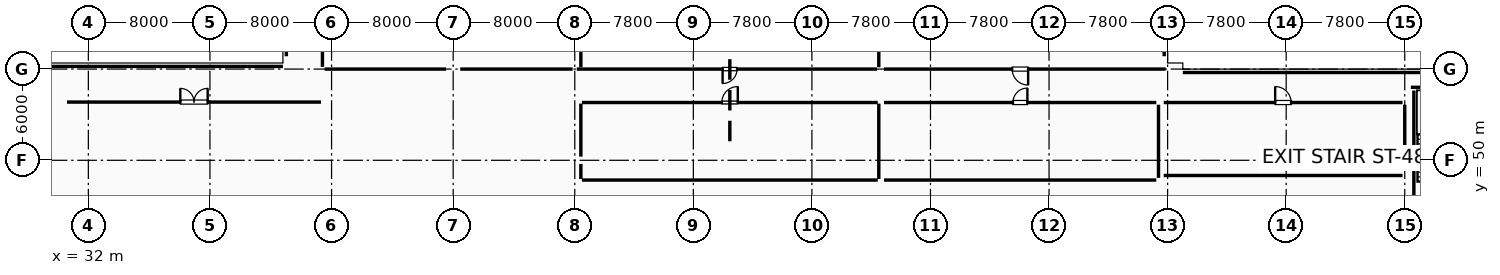
"""IFC4 building model, lengths in metres.
Left out: names, types, materials, properties, quantities, classifications, styles, units other than length and angle.
Written with IfcOpenShell. Run it as: python <this file> out.ifc"""

import sys

from ifc_helpers import new_model, si_unit, direction, frame, frame_2d, origin, origin_2d, place, context, subcontext, project, spatial, rectangle, hollow_rectangle, i_section, extrude, element, fill, save


model = new_model("IFC4")
c1 = context("Model", 3, precision=1e-05, world=origin(), true_north=direction((0.0, 1.0)))
c2 = subcontext(c1, "Body", "Model", "MODEL_VIEW")
j1 = project(units=[si_unit("LENGTHUNIT", "METRE"), si_unit("PLANEANGLEUNIT", "RADIAN")], contexts=[c1])
p1 = place(None, origin())
s1 = spatial("IfcSite", under=j1, at=p1, CompositionType="ELEMENT")
p2 = place(p1, origin())
s2 = spatial("IfcBuilding", under=s1, at=p2, CompositionType="ELEMENT")
p3 = place(p2, frame((0.0, 0.0, -4.8)))
s3 = spatial("IfcBuildingStorey", under=s2, at=p3, CompositionType="ELEMENT", Elevation=-4.8)
for number, where, z_axis, x_axis in (
    (1, (32.0, 50.0, 0.0), (0.0, 0.0, 1.0), (1.0, 0.0, 0.0)),
    (2, (32.0, 56.0, 0.0), (0.0, 0.0, 1.0), (1.0, 0.0, 0.0)),
):
    element("IfcColumn", number, at=place(p3, frame(where, z_axis=z_axis, x_axis=x_axis)), inside=s3, PredefinedType="COLUMN", context=c2, shape_type="SweptSolid", body=[
        extrude(rectangle(XDim=0.75, YDim=0.75, at=origin_2d()), origin(), (0.0, 0.0, 1.0), 4.8),
    ])
for number, where, z_axis, x_axis in (
    (3, (40.0, 50.0, 0.0), (0.0, 0.0, 1.0), (1.0, 0.0, 0.0)),
    (4, (40.0, 56.0, 0.0), (0.0, 0.0, 1.0), (1.0, 0.0, 0.0)),
    (5, (56.0, 50.0, 0.0), (0.0, 0.0, 1.0), (1.0, 0.0, 0.0)),
    (6, (56.0, 56.0, 0.0), (0.0, 0.0, 1.0), (1.0, 0.0, 0.0)),
):
    element("IfcColumn", number, at=place(p3, frame(where, z_axis=z_axis, x_axis=x_axis)), inside=s3, PredefinedType="COLUMN", context=c2, shape_type="SweptSolid", body=[
        extrude(rectangle(XDim=0.9, YDim=0.9, at=origin_2d()), origin(), (0.0, 0.0, 1.0), 4.8),
    ])
p4 = place(p3, frame((64.0, 50.0, 0.0), z_axis=(0.0, 0.0, 1.0), x_axis=(1.0, 0.0, 0.0)))
e7 = element("IfcColumn", 7, at=p4, inside=s3, PredefinedType="COLUMN", context=c2, shape_type="SweptSolid", body=[
    extrude(hollow_rectangle(XDim=0.45, YDim=0.45, WallThickness=0.02, at=origin_2d()), origin(), (0.0, 0.0, 1.0), 4.8),
])
p5 = place(p3, frame((64.0, 56.0, 0.0), z_axis=(0.0, 0.0, 1.0), x_axis=(1.0, 0.0, 0.0)))
e8 = element("IfcColumn", 8, at=p5, inside=s3, PredefinedType="COLUMN", context=c2, shape_type="SweptSolid", body=[
    extrude(i_section(OverallWidth=0.25, OverallDepth=0.45, WebThickness=0.011, FlangeThickness=0.014, FilletRadius=0.015, at=origin_2d()), origin(), (0.0, 0.0, 1.0), 4.8),
])
p6 = place(p3, frame((103.0, 50.0, 0.0), z_axis=(0.0, 0.0, 1.0), x_axis=(1.0, 0.0, 0.0)))
e9 = element("IfcColumn", 9, at=p6, inside=s3, PredefinedType="COLUMN", context=c2, shape_type="SweptSolid", body=[
    extrude(hollow_rectangle(XDim=0.45, YDim=0.45, WallThickness=0.02, at=origin_2d()), origin(), (0.0, 0.0, 1.0), 4.8),
])
p7 = place(p3, frame((103.0, 56.0, 0.0), z_axis=(0.0, 0.0, 1.0), x_axis=(1.0, 0.0, 0.0)))
e10 = element("IfcColumn", 10, at=p7, inside=s3, PredefinedType="COLUMN", context=c2, shape_type="SweptSolid", body=[
    extrude(i_section(OverallWidth=0.25, OverallDepth=0.45, WebThickness=0.011, FlangeThickness=0.014, FilletRadius=0.015, at=origin_2d()), origin(), (0.0, 0.0, 1.0), 4.8),
])
for number, where, z_axis, x_axis in (
    (11, (110.8, 50.0, 0.0), (0.0, 0.0, 1.0), (1.0, 0.0, 0.0)),
    (12, (110.8, 56.0, 0.0), (0.0, 0.0, 1.0), (1.0, 0.0, 0.0)),
):
    element("IfcColumn", number, at=place(p3, frame(where, z_axis=z_axis, x_axis=x_axis)), inside=s3, PredefinedType="COLUMN", context=c2, shape_type="SweptSolid", body=[
        extrude(rectangle(XDim=0.9, YDim=0.9, at=origin_2d()), origin(), (0.0, 0.0, 1.0), 4.8),
    ])
for number, where, z_axis, x_axis in (
    (13, (118.6, 50.0, 0.0), (0.0, 0.0, 1.0), (1.0, 0.0, 0.0)),
    (14, (118.6, 56.0, 0.0), (0.0, 0.0, 1.0), (1.0, 0.0, 0.0)),
):
    element("IfcColumn", number, at=place(p3, frame(where, z_axis=z_axis, x_axis=x_axis)), inside=s3, PredefinedType="COLUMN", context=c2, shape_type="SweptSolid", body=[
        extrude(rectangle(XDim=0.75, YDim=0.75, at=origin_2d()), origin(), (0.0, 0.0, 1.0), 4.8),
    ])
for number, where, z_axis, x_axis in (
    (15, (40.0, 48.2, 0.0), (0.0, 0.0, 1.0), (1.0, 0.0, 0.0)),
    (16, (54.0, 48.2, 0.0), (0.0, 0.0, 1.0), (1.0, 0.0, 0.0)),
    (17, (40.0, 52.3, 0.0), (0.0, 0.0, 1.0), (1.0, 0.0, 0.0)),
    (18, (54.0, 52.3, 0.0), (0.0, 0.0, 1.0), (1.0, 0.0, 0.0)),
):
    element("IfcColumn", number, at=place(p3, frame(where, z_axis=z_axis, x_axis=x_axis)), inside=s3, PredefinedType="COLUMN", context=c2, shape_type="SweptSolid", body=[
        extrude(i_section(OverallWidth=0.25, OverallDepth=0.35, WebThickness=0.01, FlangeThickness=0.012, FilletRadius=0.012, at=origin_2d()), origin(), (0.0, 0.0, 1.0), 4.8),
    ])
p8 = place(p3, frame((16.4, 56.175, 0.0), z_axis=(0.0, 0.0, 1.0), x_axis=(1.0, 0.0, 0.0)))
e19 = element("IfcWall", 19, at=p8, inside=s3, PredefinedType="USERDEFINED", context=c2, shape_type="SweptSolid", body=[
    extrude(rectangle(XDim=28.4, YDim=0.45, at=frame_2d((14.2, 0.0))), origin(), (0.0, 0.0, 1.0), 4.38),
])
for number, where, z_axis, x_axis in (
    (20, (45.025, 56.845, 0.0), (0.0, 0.0, 1.0), (0.0, 1.0, 0.0)),
    (21, (102.775, 82.755, 0.0), (0.0, 0.0, 1.0), (0.0, -1.0, 0.0)),
):
    element("IfcWall", number, at=place(p3, frame(where, z_axis=z_axis, x_axis=x_axis)), inside=s3, PredefinedType="USERDEFINED", context=c2, shape_type="SweptSolid", body=[
        extrude(rectangle(XDim=25.91, YDim=0.45, at=frame_2d((12.955, 0.0))), origin(), (0.0, 0.0, 1.0), 4.38),
    ])
p9 = place(p3, frame((104.0, 55.775, 0.0), z_axis=(0.0, 0.0, 1.0), x_axis=(1.0, 0.0, 0.0)))
e22 = element("IfcWall", 22, at=p9, inside=s3, PredefinedType="USERDEFINED", context=c2, shape_type="SweptSolid", body=[
    extrude(rectangle(XDim=27.2, YDim=0.45, at=frame_2d((13.6, 0.0))), origin(), (0.0, 0.0, 1.0), 4.38),
])
p10 = place(p3, frame((127.4, 54.8, 0.0), z_axis=(0.0, 0.0, 1.0), x_axis=(-1.0, 0.0, 0.0)))
e23 = element("IfcWall", 23, at=p10, inside=s3, PredefinedType="SHEAR", context=c2, shape_type="SweptSolid", body=[
    extrude(rectangle(XDim=8.4, YDim=0.4, at=frame_2d((4.2, 0.0))), origin(), (0.0, 0.0, 1.0), 4.48),
])
p11 = place(p3, frame((119.2, 54.59, 0.0), z_axis=(0.0, 0.0, 1.0), x_axis=(0.0, -1.0, 0.0)))
e24 = element("IfcWall", 24, at=p11, inside=s3, PredefinedType="SHEAR", context=c2, shape_type="SweptSolid", body=[
    extrude(rectangle(XDim=8.38, YDim=0.4, at=frame_2d((4.19, 0.0))), origin(), (0.0, 0.0, 1.0), 4.48),
])
p12 = place(p3, frame((30.595, 53.83, 0.0), z_axis=(0.0, 0.0, 1.0), x_axis=(1.0, 0.0, 0.0)))
e25 = element("IfcWall", 25, at=p12, inside=s3, PredefinedType="PARTITIONING", context=c2, shape_type="SweptSolid", body=[
    extrude(rectangle(XDim=16.71, YDim=0.25, at=frame_2d((8.355, 0.0))), origin(), (0.0, 0.0, 1.0), 4.47),
])
p13 = place(p12, frame((7.455, 0.0, 0.0)))
e26 = element("IfcOpeningElement", 26, at=p13, cuts=e25, PredefinedType="OPENING", context=c2, shape_type="SweptSolid", body=[
    extrude(rectangle(XDim=1.8, YDim=2.15, at=frame_2d((0.9, 1.075))), frame((0.0, 0.135, 0.0), z_axis=(0.0, -1.0, 0.0), x_axis=(1.0, 0.0, 0.0)), (0.0, 0.0, 1.0), 0.27),
])
p14 = place(p3, frame((64.47, 53.8, 0.0), z_axis=(0.0, 0.0, 1.0), x_axis=(1.0, 0.0, 0.0)))
e27 = element("IfcWall", 27, at=p14, inside=s3, PredefinedType="PARTITIONING", context=c2, shape_type="SweptSolid", body=[
    extrude(rectangle(XDim=19.46, YDim=0.1, at=frame_2d((9.73, 0.0))), origin(), (0.0, 0.0, 1.0), 4.39),
])
p15 = place(p14, frame((9.205, 0.0, 0.0)))
e28 = element("IfcOpeningElement", 28, at=p15, cuts=e27, PredefinedType="OPENING", context=c2, shape_type="SweptSolid", body=[
    extrude(rectangle(XDim=1.05, YDim=2.15, at=frame_2d((0.525, 1.075))), frame((0.0, 0.06, 0.0), z_axis=(0.0, -1.0, 0.0), x_axis=(1.0, 0.0, 0.0)), (0.0, 0.0, 1.0), 0.12),
])
p16 = place(p3, frame((84.0, 53.73, 0.0), z_axis=(0.0, 0.0, 1.0), x_axis=(0.0, -1.0, 0.0)))
e29 = element("IfcWall", 29, at=p16, inside=s3, PredefinedType="PARTITIONING", context=c2, shape_type="SweptSolid", body=[
    extrude(rectangle(XDim=4.96, YDim=0.1, at=frame_2d((2.48, 0.0))), origin(), (0.0, 0.0, 1.0), 4.39),
])
p17 = place(p3, frame((83.93, 48.7, 0.0), z_axis=(0.0, 0.0, 1.0), x_axis=(-1.0, 0.0, 0.0)))
e30 = element("IfcWall", 30, at=p17, inside=s3, PredefinedType="PARTITIONING", context=c2, shape_type="SweptSolid", body=[
    extrude(rectangle(XDim=19.46, YDim=0.1, at=frame_2d((9.73, 0.0))), origin(), (0.0, 0.0, 1.0), 4.39),
])
p18 = place(p3, frame((64.4, 48.77, 0.0), z_axis=(0.0, 0.0, 1.0), x_axis=(0.0, 1.0, 0.0)))
e31 = element("IfcWall", 31, at=p18, inside=s3, PredefinedType="PARTITIONING", context=c2, shape_type="SweptSolid", body=[
    extrude(rectangle(XDim=0.99, YDim=0.1, at=frame_2d((0.495, 0.0))), origin(), (0.0, 0.0, 1.0), 4.39),
])
p19 = place(p3, frame((64.4, 50.24, 0.0), z_axis=(0.0, 0.0, 1.0), x_axis=(0.0, 1.0, 0.0)))
e32 = element("IfcWall", 32, at=p19, inside=s3, PredefinedType="PARTITIONING", context=c2, shape_type="SweptSolid", body=[
    extrude(rectangle(XDim=3.49, YDim=0.1, at=frame_2d((1.745, 0.0))), origin(), (0.0, 0.0, 1.0), 4.39),
])
p20 = place(p3, frame((84.0, 70.48, 0.0), z_axis=(0.0, 0.0, 1.0), x_axis=(0.0, -1.0, 0.0)))
e33 = element("IfcWall", 33, at=p20, inside=s3, PredefinedType="PARTITIONING", context=c2, shape_type="SweptSolid", body=[
    extrude(rectangle(XDim=14.36, YDim=0.2, at=frame_2d((7.18, 0.0))), origin(), (0.0, 0.0, 1.0), 4.39),
])
p21 = place(p3, frame((83.88, 56.0, 0.0), z_axis=(0.0, 0.0, 1.0), x_axis=(-1.0, 0.0, 0.0)))
e34 = element("IfcWall", 34, at=p21, inside=s3, PredefinedType="PARTITIONING", context=c2, shape_type="SweptSolid", body=[
    extrude(rectangle(XDim=19.751, YDim=0.2, at=frame_2d((9.875, 0.0))), origin(), (0.0, 0.0, 1.0), 3.78),
])
p22 = place(p21, frame((9.205, 0.0, 0.0)))
e35 = element("IfcOpeningElement", 35, at=p22, cuts=e34, PredefinedType="OPENING", context=c2, shape_type="SweptSolid", body=[
    extrude(rectangle(XDim=0.95, YDim=2.15, at=frame_2d((0.475, 1.075))), frame((0.0, 0.11, 0.0), z_axis=(0.0, -1.0, 0.0), x_axis=(1.0, 0.0, 0.0)), (0.0, 0.0, 1.0), 0.22),
])
p23 = place(p3, frame((64.4, 56.12, 0.0), z_axis=(0.0, 0.0, 1.0), x_axis=(0.0, 1.0, 0.0)))
e36 = element("IfcWall", 36, at=p23, inside=s3, PredefinedType="PARTITIONING", context=c2, shape_type="SweptSolid", body=[
    extrude(rectangle(XDim=14.36, YDim=0.2, at=frame_2d((7.18, 0.0))), origin(), (0.0, 0.0, 1.0), 3.38),
])
p24 = place(p3, frame((102.871, 56.0, 0.0), z_axis=(0.0, 0.0, 1.0), x_axis=(-1.0, 0.0, 0.0)))
e37 = element("IfcWall", 37, at=p24, inside=s3, PredefinedType="PARTITIONING", context=c2, shape_type="SweptSolid", body=[
    extrude(rectangle(XDim=18.526, YDim=0.25, at=frame_2d((9.263, 0.0))), origin(), (0.0, 0.0, 1.0), 3.78),
])
p25 = place(p24, frame((9.046, 0.0, 0.0)))
e38 = element("IfcOpeningElement", 38, at=p25, cuts=e37, PredefinedType="OPENING", context=c2, shape_type="SweptSolid", body=[
    extrude(rectangle(XDim=1.05, YDim=2.15, at=frame_2d((0.525, 1.075))), frame((0.0, 0.135, 0.0), z_axis=(0.0, -1.0, 0.0), x_axis=(1.0, 0.0, 0.0)), (0.0, 0.0, 1.0), 0.27),
])
p26 = place(p3, frame((63.86, 56.0, 0.0), z_axis=(0.0, 0.0, 1.0), x_axis=(-1.0, 0.0, 0.0)))
e39 = element("IfcWall", 39, at=p26, inside=s3, PredefinedType="PARTITIONING", context=c2, shape_type="SweptSolid", body=[
    extrude(rectangle(XDim=7.395, YDim=0.25, at=frame_2d((3.698, 0.0))), origin(), (0.0, 0.0, 1.0), 4.08),
])
p27 = place(p3, frame((55.535, 56.0, 0.0), z_axis=(0.0, 0.0, 1.0), x_axis=(-1.0, 0.0, 0.0)))
e40 = element("IfcWall", 40, at=p27, inside=s3, PredefinedType="PARTITIONING", context=c2, shape_type="SweptSolid", body=[
    extrude(rectangle(XDim=7.99, YDim=0.25, at=frame_2d((3.995, 0.0))), origin(), (0.0, 0.0, 1.0), 4.47),
])
p28 = place(p3, frame((47.4, 56.145, 0.0), z_axis=(0.0, 0.0, 1.0), x_axis=(0.0, 1.0, 0.0)))
e41 = element("IfcWall", 41, at=p28, inside=s3, PredefinedType="PARTITIONING", context=c2, shape_type="SweptSolid", body=[
    extrude(rectangle(XDim=14.31, YDim=0.25, at=frame_2d((7.155, 0.0))), origin(), (0.0, 0.0, 1.0), 4.47),
])
p29 = place(p3, frame((84.345, 53.8, 0.0), z_axis=(0.0, 0.0, 1.0), x_axis=(1.0, 0.0, 0.0)))
e42 = element("IfcWall", 42, at=p29, inside=s3, PredefinedType="PARTITIONING", context=c2, shape_type="SweptSolid", body=[
    extrude(rectangle(XDim=17.91, YDim=0.25, at=frame_2d((8.955, 0.0))), origin(), (0.0, 0.0, 1.0), 4.39),
])
p30 = place(p29, frame((8.48, 0.0, 0.0)))
e43 = element("IfcOpeningElement", 43, at=p30, cuts=e42, PredefinedType="OPENING", context=c2, shape_type="SweptSolid", body=[
    extrude(rectangle(XDim=0.95, YDim=2.15, at=frame_2d((0.475, 1.075))), frame((0.0, 0.135, 0.0), z_axis=(0.0, -1.0, 0.0), x_axis=(1.0, 0.0, 0.0)), (0.0, 0.0, 1.0), 0.27),
])
p31 = place(p3, frame((102.4, 53.655, 0.0), z_axis=(0.0, 0.0, 1.0), x_axis=(0.0, -1.0, 0.0)))
e44 = element("IfcWall", 44, at=p31, inside=s3, PredefinedType="PARTITIONING", context=c2, shape_type="SweptSolid", body=[
    extrude(rectangle(XDim=4.81, YDim=0.25, at=frame_2d((2.405, 0.0))), origin(), (0.0, 0.0, 1.0), 4.47),
])
p32 = place(p3, frame((102.255, 48.7, 0.0), z_axis=(0.0, 0.0, 1.0), x_axis=(-1.0, 0.0, 0.0)))
e45 = element("IfcWall", 45, at=p32, inside=s3, PredefinedType="PARTITIONING", context=c2, shape_type="SweptSolid", body=[
    extrude(rectangle(XDim=17.91, YDim=0.25, at=frame_2d((8.955, 0.0))), origin(), (0.0, 0.0, 1.0), 4.39),
])
p33 = place(p3, frame((102.745, 53.8, 0.0), z_axis=(0.0, 0.0, 1.0), x_axis=(1.0, 0.0, 0.0)))
e46 = element("IfcWall", 46, at=p33, inside=s3, PredefinedType="PARTITIONING", context=c2, shape_type="SweptSolid", body=[
    extrude(rectangle(XDim=15.71, YDim=0.25, at=frame_2d((7.855, 0.0))), origin(), (0.0, 0.0, 1.0), 4.47),
])
p34 = place(p33, frame((7.33, 0.0, 0.0)))
e47 = element("IfcOpeningElement", 47, at=p34, cuts=e46, PredefinedType="OPENING", context=c2, shape_type="SweptSolid", body=[
    extrude(rectangle(XDim=1.05, YDim=2.15, at=frame_2d((0.525, 1.075))), frame((0.0, 0.135, 0.0), z_axis=(0.0, -1.0, 0.0), x_axis=(1.0, 0.0, 0.0)), (0.0, 0.0, 1.0), 0.27),
])
p35 = place(p3, frame((118.6, 53.655, 0.0), z_axis=(0.0, 0.0, 1.0), x_axis=(0.0, -1.0, 0.0)))
e48 = element("IfcWall", 48, at=p35, inside=s3, PredefinedType="PARTITIONING", context=c2, shape_type="SweptSolid", body=[
    extrude(rectangle(XDim=3.265, YDim=0.25, at=frame_2d((1.633, 0.0))), origin(), (0.0, 0.0, 1.0), 3.96),
])
p36 = place(p3, frame((118.455, 49.0, 0.0), z_axis=(0.0, 0.0, 1.0), x_axis=(-1.0, 0.0, 0.0)))
e49 = element("IfcWall", 49, at=p36, inside=s3, PredefinedType="PARTITIONING", context=c2, shape_type="SweptSolid", body=[
    extrude(rectangle(XDim=15.71, YDim=0.25, at=frame_2d((7.855, 0.0))), origin(), (0.0, 0.0, 1.0), 4.47),
])
p37 = place(p13, origin())
e50 = element("IfcDoor", 50, at=p37, inside=s3, OperationType="DOUBLE_DOOR_SINGLE_SWING", PredefinedType="DOOR", context=c2, shape_type="SweptSolid", body=[
    extrude(rectangle(XDim=1.8, YDim=2.15, at=frame_2d((0.9, 1.075))), frame((0.0, 0.025, 0.0), z_axis=(0.0, -1.0, 0.0), x_axis=(1.0, 0.0, 0.0)), (0.0, 0.0, 1.0), 0.05),
])
fill(e26, e50)
p38 = place(p15, origin())
e51 = element("IfcDoor", 51, at=p38, inside=s3, OperationType="SINGLE_SWING_RIGHT", PredefinedType="DOOR", context=c2, shape_type="SweptSolid", body=[
    extrude(rectangle(XDim=1.05, YDim=2.15, at=frame_2d((0.525, 1.075))), frame((0.0, 0.025, 0.0), z_axis=(0.0, -1.0, 0.0), x_axis=(1.0, 0.0, 0.0)), (0.0, 0.0, 1.0), 0.05),
])
fill(e28, e51)
p39 = place(p22, origin())
e52 = element("IfcDoor", 52, at=p39, inside=s3, OperationType="SINGLE_SWING_RIGHT", PredefinedType="DOOR", context=c2, shape_type="SweptSolid", body=[
    extrude(rectangle(XDim=0.95, YDim=2.15, at=frame_2d((0.475, 1.075))), frame((0.0, 0.025, 0.0), z_axis=(0.0, -1.0, 0.0), x_axis=(1.0, 0.0, 0.0)), (0.0, 0.0, 1.0), 0.05),
])
fill(e35, e52)
p40 = place(p25, origin())
e53 = element("IfcDoor", 53, at=p40, inside=s3, OperationType="SINGLE_SWING_LEFT", PredefinedType="DOOR", context=c2, shape_type="SweptSolid", body=[
    extrude(rectangle(XDim=1.05, YDim=2.15, at=frame_2d((0.525, 1.075))), frame((0.0, 0.025, 0.0), z_axis=(0.0, -1.0, 0.0), x_axis=(1.0, 0.0, 0.0)), (0.0, 0.0, 1.0), 0.05),
])
fill(e38, e53)
p41 = place(p30, origin())
e54 = element("IfcDoor", 54, at=p41, inside=s3, OperationType="SINGLE_SWING_RIGHT", PredefinedType="DOOR", context=c2, shape_type="SweptSolid", body=[
    extrude(rectangle(XDim=0.95, YDim=2.15, at=frame_2d((0.475, 1.075))), frame((0.0, 0.025, 0.0), z_axis=(0.0, -1.0, 0.0), x_axis=(1.0, 0.0, 0.0)), (0.0, 0.0, 1.0), 0.05),
])
fill(e43, e54)
p42 = place(p34, origin())
e55 = element("IfcDoor", 55, at=p42, inside=s3, OperationType="SINGLE_SWING_LEFT", PredefinedType="DOOR", context=c2, shape_type="SweptSolid", body=[
    extrude(rectangle(XDim=1.05, YDim=2.15, at=frame_2d((0.525, 1.075))), frame((0.0, 0.025, 0.0), z_axis=(0.0, -1.0, 0.0), x_axis=(1.0, 0.0, 0.0)), (0.0, 0.0, 1.0), 0.05),
])
fill(e47, e55)
save(model, sys.argv[1])
